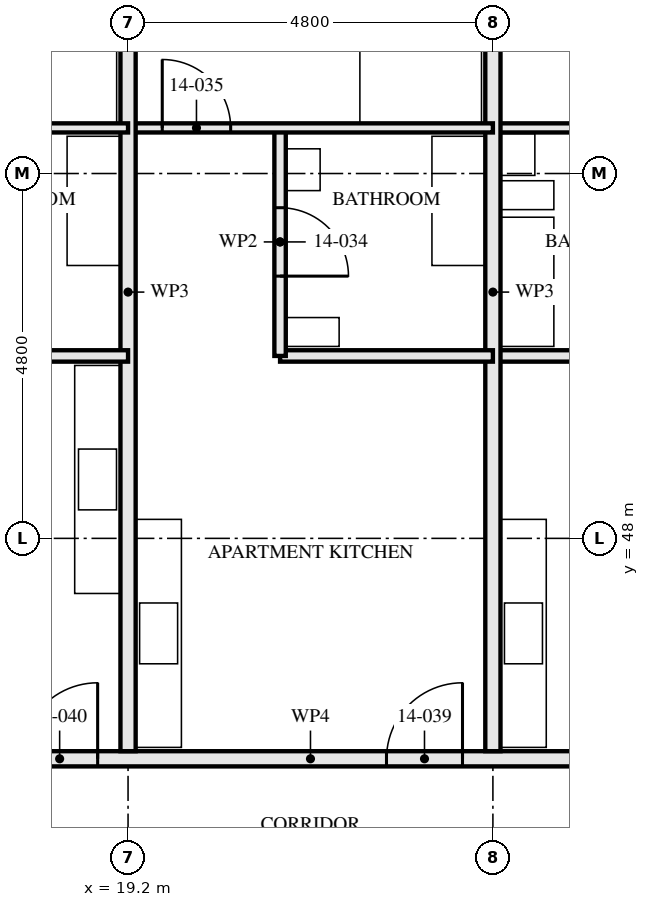
"""IFC4 building model, lengths in metres.
Left out: names, types, materials, properties, quantities, classifications, styles, units other than length and angle.
Written with IfcOpenShell. Run it as: python <this file> out.ifc"""

import sys

from ifc_helpers import new_model, si_unit, direction, frame, frame_2d, origin, place, context, subcontext, project, spatial, rectangle, extrude, element, fill, save


model = new_model("IFC4")
c1 = context("Model", 3, precision=1e-05, world=origin(), true_north=direction((0.0, 1.0)))
c2 = subcontext(c1, "Body", "Model", "MODEL_VIEW")
j1 = project(units=[si_unit("LENGTHUNIT", "METRE"), si_unit("PLANEANGLEUNIT", "RADIAN")], contexts=[c1])
p1 = place(None, origin())
s1 = spatial("IfcSite", under=j1, at=p1, CompositionType="ELEMENT")
p2 = place(p1, origin())
s2 = spatial("IfcBuilding", under=s1, at=p2, CompositionType="ELEMENT")
p3 = place(p2, frame((0.0, 0.0, 55.0)))
s3 = spatial("IfcBuildingStorey", under=s2, at=p3, CompositionType="ELEMENT", Elevation=55.0)
p4 = place(p3, frame((26.8, 50.4, 0.0), z_axis=(0.0, 0.0, 1.0), x_axis=(-1.0, 0.0, 0.0)))
e1 = element("IfcWall", 1, at=p4, inside=s3, PredefinedType="PARTITIONING", context=c2, shape_type="SweptSolid", body=[
    extrude(rectangle(XDim=2.8, YDim=0.15, at=frame_2d((1.4, 0.0))), origin(), (0.0, 0.0, 1.0), 3.33),
])
p5 = place(p3, frame((28.8, 53.4, 0.0), z_axis=(0.0, 0.0, 1.0), x_axis=(-1.0, 0.0, 0.0)))
e2 = element("IfcWall", 2, at=p5, inside=s3, PredefinedType="PARTITIONING", context=c2, shape_type="SweptSolid", body=[
    extrude(rectangle(XDim=4.8, YDim=0.12, at=frame_2d((2.4, 0.0))), origin(), (0.0, 0.0, 1.0), 3.33),
])
p6 = place(p5, frame((0.925, 0.0, 0.0)))
e3 = element("IfcOpeningElement", 3, at=p6, cuts=e2, PredefinedType="OPENING", context=c2, shape_type="SweptSolid", body=[
    extrude(rectangle(XDim=0.9, YDim=2.1, at=frame_2d((0.45, 1.05))), frame((0.0, 0.071, 0.0), z_axis=(0.0, -1.0, 0.0), x_axis=(1.0, 0.0, 0.0)), (0.0, 0.0, 1.0), 0.141),
])
p7 = place(p3, frame((24.0, 57.28, 0.0), z_axis=(0.0, 0.0, 1.0), x_axis=(0.0, -1.0, 0.0)))
e4 = element("IfcWall", 4, at=p7, inside=s3, PredefinedType="PARTITIONING", context=c2, shape_type="SweptSolid", body=[
    extrude(rectangle(XDim=12.08, YDim=0.2, at=frame_2d((6.04, 0.0))), origin(), (0.0, 0.0, 1.0), 2.55),
])
p8 = place(p3, frame((21.2, 53.4, 0.0), z_axis=(0.0, 0.0, 1.0), x_axis=(0.0, -1.0, 0.0)))
e5 = element("IfcWall", 5, at=p8, inside=s3, PredefinedType="PARTITIONING", context=c2, shape_type="SweptSolid", body=[
    extrude(rectangle(XDim=3.0, YDim=0.15, at=frame_2d((1.5, 0.0))), origin(), (0.0, 0.0, 1.0), 2.55),
])
p9 = place(p8, frame((1.05, 0.0, 0.0)))
e6 = element("IfcOpeningElement", 6, at=p9, cuts=e5, PredefinedType="OPENING", context=c2, shape_type="SweptSolid", body=[
    extrude(rectangle(XDim=0.9, YDim=2.1, at=frame_2d((0.45, 1.05))), frame((0.0, 0.085, 0.0), z_axis=(0.0, -1.0, 0.0), x_axis=(1.0, 0.0, 0.0)), (0.0, 0.0, 1.0), 0.171),
])
p10 = place(p3, frame((24.0, 50.4, 0.0), z_axis=(0.0, 0.0, 1.0), x_axis=(-1.0, 0.0, 0.0)))
e7 = element("IfcWall", 7, at=p10, inside=s3, PredefinedType="PARTITIONING", context=c2, shape_type="SweptSolid", body=[
    extrude(rectangle(XDim=2.8, YDim=0.15, at=frame_2d((1.4, 0.0))), origin(), (0.0, 0.0, 1.0), 3.33),
])
p11 = place(p3, frame((24.0, 53.4, 0.0), z_axis=(0.0, 0.0, 1.0), x_axis=(-1.0, 0.0, 0.0)))
e8 = element("IfcWall", 8, at=p11, inside=s3, PredefinedType="PARTITIONING", context=c2, shape_type="SweptSolid", body=[
    extrude(rectangle(XDim=4.8, YDim=0.12, at=frame_2d((2.4, 0.0))), origin(), (0.0, 0.0, 1.0), 3.33),
])
p12 = place(p11, frame((3.45, 0.0, 0.0)))
e9 = element("IfcOpeningElement", 9, at=p12, cuts=e8, PredefinedType="OPENING", context=c2, shape_type="SweptSolid", body=[
    extrude(rectangle(XDim=0.9, YDim=2.1, at=frame_2d((0.45, 1.05))), frame((0.0, 0.071, 0.0), z_axis=(0.0, -1.0, 0.0), x_axis=(1.0, 0.0, 0.0)), (0.0, 0.0, 1.0), 0.141),
])
p13 = place(p3, frame((19.2, 57.28, 0.0), z_axis=(0.0, 0.0, 1.0), x_axis=(0.0, -1.0, 0.0)))
e10 = element("IfcWall", 10, at=p13, inside=s3, PredefinedType="PARTITIONING", context=c2, shape_type="SweptSolid", body=[
    extrude(rectangle(XDim=12.08, YDim=0.2, at=frame_2d((6.04, 0.0))), origin(), (0.0, 0.0, 1.0), 2.55),
])
p14 = place(p3, frame((19.2, 50.4, 0.0), z_axis=(0.0, 0.0, 1.0), x_axis=(-1.0, 0.0, 0.0)))
e11 = element("IfcWall", 11, at=p14, inside=s3, PredefinedType="PARTITIONING", context=c2, shape_type="SweptSolid", body=[
    extrude(rectangle(XDim=2.8, YDim=0.15, at=frame_2d((1.4, 0.0))), origin(), (0.0, 0.0, 1.0), 3.33),
])
p15 = place(p3, frame((19.2, 53.4, 0.0), z_axis=(0.0, 0.0, 1.0), x_axis=(-1.0, 0.0, 0.0)))
e12 = element("IfcWall", 12, at=p15, inside=s3, PredefinedType="PARTITIONING", context=c2, shape_type="SweptSolid", body=[
    extrude(rectangle(XDim=4.8, YDim=0.12, at=frame_2d((2.4, 0.0))), origin(), (0.0, 0.0, 1.0), 3.33),
])
p16 = place(p15, frame((2.975, 0.0, 0.0)))
e13 = element("IfcOpeningElement", 13, at=p16, cuts=e12, PredefinedType="OPENING", context=c2, shape_type="SweptSolid", body=[
    extrude(rectangle(XDim=0.9, YDim=2.1, at=frame_2d((0.45, 1.05))), frame((0.0, 0.071, 0.0), z_axis=(0.0, -1.0, 0.0), x_axis=(1.0, 0.0, 0.0)), (0.0, 0.0, 1.0), 0.141),
])
p17 = place(p3, frame((28.8, 45.1, 0.0), z_axis=(0.0, 0.0, 1.0), x_axis=(-1.0, 0.0, 0.0)))
e14 = element("IfcWall", 14, at=p17, inside=s3, PredefinedType="PARTITIONING", context=c2, shape_type="SweptSolid", body=[
    extrude(rectangle(XDim=14.4, YDim=0.2, at=frame_2d((7.2, 0.0))), origin(), (0.0, 0.0, 1.0), 3.33),
])
p18 = place(p17, frame((0.4, 0.0, 0.0)))
e15 = element("IfcOpeningElement", 15, at=p18, cuts=e14, PredefinedType="OPENING", context=c2, shape_type="SweptSolid", body=[
    extrude(rectangle(XDim=1.0, YDim=2.1, at=frame_2d((0.5, 1.05))), frame((0.0, 0.111, 0.0), z_axis=(0.0, -1.0, 0.0), x_axis=(1.0, 0.0, 0.0)), (0.0, 0.0, 1.0), 0.221),
])
p19 = place(p17, frame((5.2, 0.0, 0.0)))
e16 = element("IfcOpeningElement", 16, at=p19, cuts=e14, PredefinedType="OPENING", context=c2, shape_type="SweptSolid", body=[
    extrude(rectangle(XDim=1.0, YDim=2.1, at=frame_2d((0.5, 1.05))), frame((0.0, 0.111, 0.0), z_axis=(0.0, -1.0, 0.0), x_axis=(1.0, 0.0, 0.0)), (0.0, 0.0, 1.0), 0.221),
])
p20 = place(p17, frame((10.0, 0.0, 0.0)))
e17 = element("IfcOpeningElement", 17, at=p20, cuts=e14, PredefinedType="OPENING", context=c2, shape_type="SweptSolid", body=[
    extrude(rectangle(XDim=1.0, YDim=2.1, at=frame_2d((0.5, 1.05))), frame((0.0, 0.111, 0.0), z_axis=(0.0, -1.0, 0.0), x_axis=(1.0, 0.0, 0.0)), (0.0, 0.0, 1.0), 0.221),
])
p21 = place(p9, origin())
e18 = element("IfcDoor", 18, at=p21, inside=s3, OperationType="SINGLE_SWING_LEFT", PredefinedType="DOOR", context=c2, shape_type="SweptSolid", body=[
    extrude(rectangle(XDim=0.9, YDim=2.1, at=frame_2d((0.45, 1.05))), frame((0.0, 0.022, 0.0), z_axis=(0.0, -1.0, 0.0), x_axis=(1.0, 0.0, 0.0)), (0.0, 0.0, 1.0), 0.044),
])
fill(e6, e18)
p22 = place(p12, frame((0.9, 0.0, 0.0), z_axis=(0.0, 0.0, 1.0), x_axis=(-1.0, 0.0, 0.0)))
e19 = element("IfcDoor", 19, at=p22, inside=s3, OperationType="SINGLE_SWING_RIGHT", PredefinedType="DOOR", context=c2, shape_type="SweptSolid", body=[
    extrude(rectangle(XDim=0.9, YDim=2.1, at=frame_2d((0.45, 1.05))), frame((0.0, 0.022, 0.0), z_axis=(0.0, -1.0, 0.0), x_axis=(1.0, 0.0, 0.0)), (0.0, 0.0, 1.0), 0.044),
])
fill(e9, e19)
p23 = place(p19, frame((1.0, 0.0, 0.0), z_axis=(0.0, 0.0, 1.0), x_axis=(-1.0, 0.0, 0.0)))
e20 = element("IfcDoor", 20, at=p23, inside=s3, OperationType="SINGLE_SWING_LEFT", PredefinedType="DOOR", context=c2, shape_type="SweptSolid", body=[
    extrude(rectangle(XDim=1.0, YDim=2.1, at=frame_2d((0.5, 1.05))), frame((0.0, 0.027, 0.0), z_axis=(0.0, -1.0, 0.0), x_axis=(1.0, 0.0, 0.0)), (0.0, 0.0, 1.0), 0.054),
])
fill(e16, e20)
p24 = place(p20, frame((1.0, 0.0, 0.0), z_axis=(0.0, 0.0, 1.0), x_axis=(-1.0, 0.0, 0.0)))
e21 = element("IfcDoor", 21, at=p24, inside=s3, OperationType="SINGLE_SWING_LEFT", PredefinedType="DOOR", context=c2, shape_type="SweptSolid", body=[
    extrude(rectangle(XDim=1.0, YDim=2.1, at=frame_2d((0.5, 1.05))), frame((0.0, 0.027, 0.0), z_axis=(0.0, -1.0, 0.0), x_axis=(1.0, 0.0, 0.0)), (0.0, 0.0, 1.0), 0.054),
])
fill(e17, e21)
save(model, sys.argv[1])
